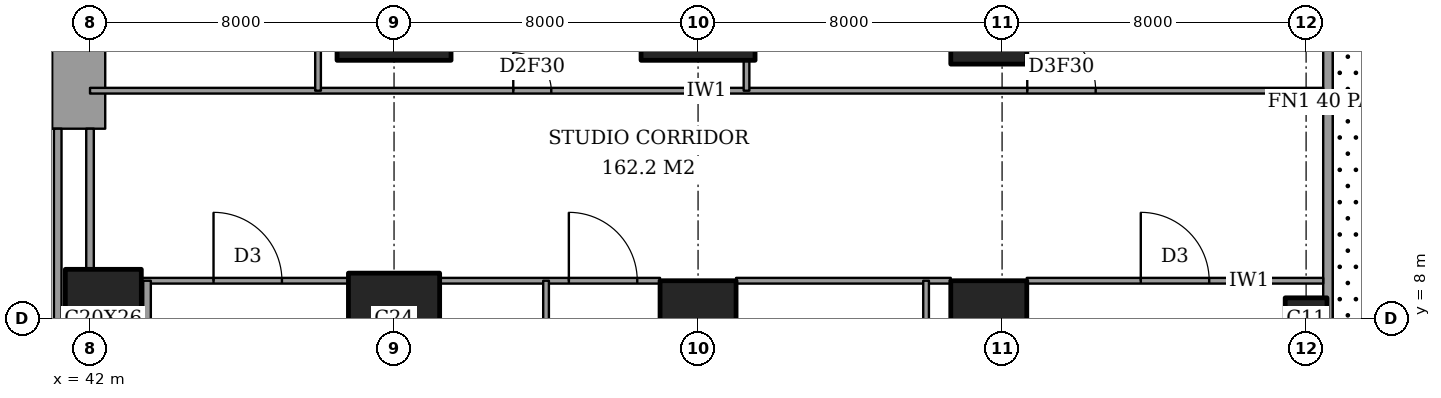
"""IFC4 building model, lengths in metres.
Left out: names, types, materials, properties, quantities, classifications, styles, units other than length and angle.
Written with IfcOpenShell. Run it as: python <this file> out.ifc"""

import sys

from ifc_helpers import new_model, si_unit, direction, frame, frame_2d, origin, origin_2d, place, context, subcontext, project, spatial, rectangle, extrude, element, fill, save


model = new_model("IFC4")
c1 = context("Model", 3, precision=1e-05, world=origin(), true_north=direction((0.0, 1.0)))
c2 = subcontext(c1, "Body", "Model", "MODEL_VIEW")
j1 = project(units=[si_unit("LENGTHUNIT", "METRE"), si_unit("PLANEANGLEUNIT", "RADIAN")], contexts=[c1])
p1 = place(None, origin())
s1 = spatial("IfcSite", under=j1, at=p1, CompositionType="ELEMENT")
p2 = place(p1, origin())
s2 = spatial("IfcBuilding", under=s1, at=p2, CompositionType="ELEMENT")
p3 = place(p2, frame((0.0, 0.0, 11.0)))
s3 = spatial("IfcBuildingStorey", under=s2, at=p3, CompositionType="ELEMENT", Elevation=11.0)
p4 = place(p3, frame((42.35, 8.0, 0.0), z_axis=(0.0, 0.0, 1.0), x_axis=(1.0, 0.0, 0.0)))
e1 = element("IfcColumn", 1, at=p4, inside=s3, PredefinedType="COLUMN", context=c2, shape_type="SweptSolid", body=[
    extrude(rectangle(XDim=2.0, YDim=2.6, at=origin_2d()), origin(), (0.0, 0.0, 1.0), 5.0),
])
p5 = place(p3, frame((50.0, 8.0, 0.0), z_axis=(0.0, 0.0, 1.0), x_axis=(1.0, 0.0, 0.0)))
e2 = element("IfcColumn", 2, at=p5, inside=s3, PredefinedType="COLUMN", context=c2, shape_type="SweptSolid", body=[
    extrude(rectangle(XDim=2.4, YDim=2.4, at=origin_2d()), origin(), (0.0, 0.0, 1.0), 5.0),
])
p6 = place(p3, frame((50.0, 16.0, 0.0), z_axis=(0.0, 0.0, 1.0), x_axis=(1.0, 0.0, 0.0)))
e3 = element("IfcColumn", 3, at=p6, inside=s3, PredefinedType="COLUMN", context=c2, shape_type="SweptSolid", body=[
    extrude(rectangle(XDim=3.0, YDim=2.4, at=origin_2d()), origin(), (0.0, 0.0, 1.0), 5.0),
])
p7 = place(p3, frame((58.0, 8.0, 0.0), z_axis=(0.0, 0.0, 1.0), x_axis=(1.0, 0.0, 0.0)))
e4 = element("IfcColumn", 4, at=p7, inside=s3, PredefinedType="COLUMN", context=c2, shape_type="SweptSolid", body=[
    extrude(rectangle(XDim=2.0, YDim=2.0, at=origin_2d()), origin(), (0.0, 0.0, 1.0), 5.0),
])
p8 = place(p3, frame((58.0, 16.0, 0.0), z_axis=(0.0, 0.0, 1.0), x_axis=(1.0, 0.0, 0.0)))
e5 = element("IfcColumn", 5, at=p8, inside=s3, PredefinedType="COLUMN", context=c2, shape_type="SweptSolid", body=[
    extrude(rectangle(XDim=3.0, YDim=2.4, at=origin_2d()), origin(), (0.0, 0.0, 1.0), 5.0),
])
p9 = place(p3, frame((65.65, 8.0, 0.0), z_axis=(0.0, 0.0, 1.0), x_axis=(1.0, 0.0, 0.0)))
e6 = element("IfcColumn", 6, at=p9, inside=s3, PredefinedType="COLUMN", context=c2, shape_type="SweptSolid", body=[
    extrude(rectangle(XDim=2.0, YDim=2.0, at=origin_2d()), origin(), (0.0, 0.0, 1.0), 5.0),
])
p10 = place(p3, frame((65.65, 16.0, 0.0), z_axis=(0.0, 0.0, 1.0), x_axis=(0.0, 1.0, 0.0)))
e7 = element("IfcColumn", 7, at=p10, inside=s3, PredefinedType="COLUMN", context=c2, shape_type="SweptSolid", body=[
    extrude(rectangle(XDim=2.6, YDim=2.0, at=origin_2d()), origin(), (0.0, 0.0, 1.0), 5.0),
])
p11 = place(p3, frame((74.0, 8.0, 0.0), z_axis=(0.0, 0.0, 1.0), x_axis=(1.0, 0.0, 0.0)))
e8 = element("IfcColumn", 8, at=p11, inside=s3, PredefinedType="COLUMN", context=c2, shape_type="SweptSolid", body=[
    extrude(rectangle(XDim=1.1, YDim=1.1, at=origin_2d()), origin(), (0.0, 0.0, 1.0), 5.0),
])
p12 = place(p3, frame((41.7, 13.0, 0.0), z_axis=(0.0, 0.0, 1.0), x_axis=(0.0, 1.0, 0.0)))
e9 = element("IfcWall", 9, at=p12, inside=s3, PredefinedType="SHEAR", context=c2, shape_type="SweptSolid", body=[
    extrude(rectangle(XDim=11.85, YDim=1.4, at=frame_2d((5.925, 0.0))), origin(), (0.0, 0.0, 1.0), 5.0),
])
p13 = place(p12, frame((7.5, 0.0, 0.0)))
e10 = element("IfcOpeningElement", 10, at=p13, cuts=e9, PredefinedType="OPENING", context=c2, shape_type="SweptSolid", body=[
    extrude(rectangle(XDim=1.8, YDim=2.4, at=frame_2d((0.9, 1.2))), frame((0.0, 0.71, 0.0), z_axis=(0.0, -1.0, 0.0), x_axis=(1.0, 0.0, 0.0)), (0.0, 0.0, 1.0), 1.42),
])
p14 = place(p3, frame((74.575, -8.575, 0.0), z_axis=(0.0, 0.0, 1.0), x_axis=(0.0, 1.0, 0.0)))
e11 = element("IfcWall", 11, at=p14, inside=s3, PredefinedType="SOLIDWALL", context=c2, shape_type="SweptSolid", body=[
    extrude(rectangle(XDim=65.15, YDim=0.25, at=frame_2d((32.575, 0.0))), origin(), (0.0, 0.0, 1.0), 5.0),
])
p15 = place(p14, frame((12.075, 0.0, 0.0)))
e12 = element("IfcOpeningElement", 12, at=p15, cuts=e11, PredefinedType="OPENING", context=c2, shape_type="SweptSolid", body=[
    extrude(rectangle(XDim=1.0, YDim=2.4, at=frame_2d((0.5, 1.2))), frame((0.0, 0.135, 0.0), z_axis=(0.0, -1.0, 0.0), x_axis=(1.0, 0.0, 0.0)), (0.0, 0.0, 1.0), 0.27),
])
p16 = place(p14, frame((28.075, 0.0, 0.0)))
e13 = element("IfcOpeningElement", 13, at=p16, cuts=e11, PredefinedType="OPENING", context=c2, shape_type="SweptSolid", body=[
    extrude(rectangle(XDim=1.0, YDim=2.4, at=frame_2d((0.5, 1.2))), frame((0.0, 0.135, 0.0), z_axis=(0.0, -1.0, 0.0), x_axis=(1.0, 0.0, 0.0)), (0.0, 0.0, 1.0), 0.27),
])
p17 = place(p14, frame((41.275, 0.0, 0.0)))
e14 = element("IfcOpeningElement", 14, at=p17, cuts=e11, PredefinedType="OPENING", context=c2, shape_type="SweptSolid", body=[
    extrude(rectangle(XDim=1.0, YDim=2.4, at=frame_2d((0.5, 1.2))), frame((0.0, 0.135, 0.0), z_axis=(0.0, -1.0, 0.0), x_axis=(1.0, 0.0, 0.0)), (0.0, 0.0, 1.0), 0.27),
])
p18 = place(p3, frame((43.35, 9.0, 0.0), z_axis=(0.0, 0.0, 1.0), x_axis=(1.0, 0.0, 0.0)))
e15 = element("IfcWall", 15, at=p18, inside=s3, PredefinedType="PARTITIONING", context=c2, shape_type="SweptSolid", body=[
    extrude(rectangle(XDim=5.45, YDim=0.15, at=frame_2d((2.725, 0.0))), origin(), (0.0, 0.0, 1.0), 4.7),
])
p19 = place(p18, frame((1.9, 0.0, 0.0)))
e16 = element("IfcOpeningElement", 16, at=p19, cuts=e15, PredefinedType="OPENING", context=c2, shape_type="SweptSolid", body=[
    extrude(rectangle(XDim=1.8, YDim=2.1, at=frame_2d((0.9, 1.05))), frame((0.0, 0.085, 0.0), z_axis=(0.0, -1.0, 0.0), x_axis=(1.0, 0.0, 0.0)), (0.0, 0.0, 1.0), 0.17),
])
p20 = place(p3, frame((51.2, 9.0, 0.0), z_axis=(0.0, 0.0, 1.0), x_axis=(1.0, 0.0, 0.0)))
e17 = element("IfcWall", 17, at=p20, inside=s3, PredefinedType="PARTITIONING", context=c2, shape_type="SweptSolid", body=[
    extrude(rectangle(XDim=5.8, YDim=0.15, at=frame_2d((2.9, 0.0))), origin(), (0.0, 0.0, 1.0), 4.7),
])
p21 = place(p20, frame((3.4, 0.0, 0.0)))
e18 = element("IfcOpeningElement", 18, at=p21, cuts=e17, PredefinedType="OPENING", context=c2, shape_type="SweptSolid", body=[
    extrude(rectangle(XDim=1.8, YDim=2.1, at=frame_2d((0.9, 1.05))), frame((0.0, 0.085, 0.0), z_axis=(0.0, -1.0, 0.0), x_axis=(1.0, 0.0, 0.0)), (0.0, 0.0, 1.0), 0.17),
])
p22 = place(p3, frame((59.0, 9.0, 0.0), z_axis=(0.0, 0.0, 1.0), x_axis=(1.0, 0.0, 0.0)))
e19 = element("IfcWall", 19, at=p22, inside=s3, PredefinedType="PARTITIONING", context=c2, shape_type="SweptSolid", body=[
    extrude(rectangle(XDim=5.65, YDim=0.15, at=frame_2d((2.825, 0.0))), origin(), (0.0, 0.0, 1.0), 4.7),
])
p23 = place(p3, frame((66.65, 9.0, 0.0), z_axis=(0.0, 0.0, 1.0), x_axis=(1.0, 0.0, 0.0)))
e20 = element("IfcWall", 20, at=p23, inside=s3, PredefinedType="PARTITIONING", context=c2, shape_type="SweptSolid", body=[
    extrude(rectangle(XDim=7.8, YDim=0.15, at=frame_2d((3.9, 0.0))), origin(), (0.0, 0.0, 1.0), 4.7),
])
p24 = place(p23, frame((3.0, 0.0, 0.0)))
e21 = element("IfcOpeningElement", 21, at=p24, cuts=e20, PredefinedType="OPENING", context=c2, shape_type="SweptSolid", body=[
    extrude(rectangle(XDim=1.8, YDim=2.1, at=frame_2d((0.9, 1.05))), frame((0.0, 0.085, 0.0), z_axis=(0.0, -1.0, 0.0), x_axis=(1.0, 0.0, 0.0)), (0.0, 0.0, 1.0), 0.17),
])
p25 = place(p3, frame((42.0, 14.0, 0.0), z_axis=(0.0, 0.0, 1.0), x_axis=(1.0, 0.0, 0.0)))
e22 = element("IfcWall", 22, at=p25, inside=s3, PredefinedType="PARTITIONING", context=c2, shape_type="SweptSolid", body=[
    extrude(rectangle(XDim=32.45, YDim=0.15, at=frame_2d((16.225, 0.0))), origin(), (0.0, 0.0, 1.0), 4.7),
])
p26 = place(p25, frame((11.137, 0.0, 0.0)))
e23 = element("IfcOpeningElement", 23, at=p26, cuts=e22, PredefinedType="OPENING", context=c2, shape_type="SweptSolid", body=[
    extrude(rectangle(XDim=1.0, YDim=2.1, at=frame_2d((0.5, 1.05))), frame((0.0, 0.085, 0.0), z_axis=(0.0, -1.0, 0.0), x_axis=(1.0, 0.0, 0.0)), (0.0, 0.0, 1.0), 0.17),
])
p27 = place(p25, frame((24.663, 0.0, 0.0)))
e24 = element("IfcOpeningElement", 24, at=p27, cuts=e22, PredefinedType="OPENING", context=c2, shape_type="SweptSolid", body=[
    extrude(rectangle(XDim=1.8, YDim=2.1, at=frame_2d((0.9, 1.05))), frame((0.0, 0.085, 0.0), z_axis=(0.0, -1.0, 0.0), x_axis=(1.0, 0.0, 0.0)), (0.0, 0.0, 1.0), 0.17),
])
p28 = place(p3, frame((41.15, -0.45, 0.0), z_axis=(0.0, 0.0, 1.0), x_axis=(0.0, 1.0, 0.0)))
e25 = element("IfcWall", 25, at=p28, inside=s3, PredefinedType="PARTITIONING", context=c2, shape_type="SweptSolid", body=[
    extrude(rectangle(XDim=13.45, YDim=0.2, at=frame_2d((6.725, 0.0))), origin(), (0.0, 0.0, 1.0), 4.7),
])
p29 = place(p3, frame((42.0, 9.3, 0.0), z_axis=(0.0, 0.0, 1.0), x_axis=(0.0, 1.0, 0.0)))
e26 = element("IfcWall", 26, at=p29, inside=s3, PredefinedType="PARTITIONING", context=c2, shape_type="SweptSolid", body=[
    extrude(rectangle(XDim=3.7, YDim=0.2, at=frame_2d((1.85, 0.0))), origin(), (0.0, 0.0, 1.0), 4.7),
])
p30 = place(p3, frame((43.5, -8.45, 0.0), z_axis=(0.0, 0.0, 1.0), x_axis=(0.0, 1.0, 0.0)))
e27 = element("IfcWall", 27, at=p30, inside=s3, PredefinedType="PARTITIONING", context=c2, shape_type="SweptSolid", body=[
    extrude(rectangle(XDim=17.45, YDim=0.2, at=frame_2d((8.725, 0.0))), origin(), (0.0, 0.0, 1.0), 4.7),
])
p31 = place(p3, frame((48.0, 14.0, 0.0), z_axis=(0.0, 0.0, 1.0), x_axis=(0.0, 1.0, 0.0)))
e28 = element("IfcWall", 28, at=p31, inside=s3, PredefinedType="PARTITIONING", context=c2, shape_type="SweptSolid", body=[
    extrude(rectangle(XDim=14.0, YDim=0.15, at=frame_2d((7.0, 0.0))), origin(), (0.0, 0.0, 1.0), 4.7),
])
p32 = place(p31, frame((10.3, 0.0, 0.0)))
e29 = element("IfcOpeningElement", 29, at=p32, cuts=e28, PredefinedType="OPENING", context=c2, shape_type="SweptSolid", body=[
    extrude(rectangle(XDim=1.8, YDim=2.1, at=frame_2d((0.9, 1.05))), frame((0.0, 0.085, 0.0), z_axis=(0.0, -1.0, 0.0), x_axis=(1.0, 0.0, 0.0)), (0.0, 0.0, 1.0), 0.17),
])
p33 = place(p3, frame((54.0, -8.45, 0.0), z_axis=(0.0, 0.0, 1.0), x_axis=(0.0, 1.0, 0.0)))
e30 = element("IfcWall", 30, at=p33, inside=s3, PredefinedType="PARTITIONING", context=c2, shape_type="SweptSolid", body=[
    extrude(rectangle(XDim=17.45, YDim=0.15, at=frame_2d((8.725, 0.0))), origin(), (0.0, 0.0, 1.0), 4.7),
])
p34 = place(p3, frame((59.275, 14.0, 0.0), z_axis=(0.0, 0.0, 1.0), x_axis=(0.0, 1.0, 0.0)))
e31 = element("IfcWall", 31, at=p34, inside=s3, PredefinedType="PARTITIONING", context=c2, shape_type="SweptSolid", body=[
    extrude(rectangle(XDim=0.8, YDim=0.15, at=frame_2d((0.4, 0.0))), origin(), (0.0, 0.0, 1.0), 4.7),
])
p35 = place(p3, frame((64.0, -8.45, 0.0), z_axis=(0.0, 0.0, 1.0), x_axis=(0.0, 1.0, 0.0)))
e32 = element("IfcWall", 32, at=p35, inside=s3, PredefinedType="PARTITIONING", context=c2, shape_type="SweptSolid", body=[
    extrude(rectangle(XDim=17.45, YDim=0.15, at=frame_2d((8.725, 0.0))), origin(), (0.0, 0.0, 1.0), 4.7),
])
p36 = place(p26, origin())
e33 = element("IfcDoor", 33, at=p36, inside=s3, OperationType="SINGLE_SWING_RIGHT", PredefinedType="DOOR", context=c2, shape_type="SweptSolid", body=[
    extrude(rectangle(XDim=1.0, YDim=2.1, at=frame_2d((0.5, 1.05))), frame((0.0, 0.025, 0.0), z_axis=(0.0, -1.0, 0.0), x_axis=(1.0, 0.0, 0.0)), (0.0, 0.0, 1.0), 0.05),
])
fill(e23, e33)
p37 = place(p19, origin())
e34 = element("IfcDoor", 34, at=p37, inside=s3, OperationType="DOUBLE_DOOR_DOUBLE_SWING", PredefinedType="DOOR", context=c2, shape_type="SweptSolid", body=[
    extrude(rectangle(XDim=1.8, YDim=2.1, at=frame_2d((0.9, 1.05))), frame((0.0, 0.025, 0.0), z_axis=(0.0, -1.0, 0.0), x_axis=(1.0, 0.0, 0.0)), (0.0, 0.0, 1.0), 0.05),
])
fill(e16, e34)
p38 = place(p21, origin())
e35 = element("IfcDoor", 35, at=p38, inside=s3, OperationType="DOUBLE_DOOR_DOUBLE_SWING", PredefinedType="DOOR", context=c2, shape_type="SweptSolid", body=[
    extrude(rectangle(XDim=1.8, YDim=2.1, at=frame_2d((0.9, 1.05))), frame((0.0, 0.025, 0.0), z_axis=(0.0, -1.0, 0.0), x_axis=(1.0, 0.0, 0.0)), (0.0, 0.0, 1.0), 0.05),
])
fill(e18, e35)
p39 = place(p24, origin())
e36 = element("IfcDoor", 36, at=p39, inside=s3, OperationType="DOUBLE_DOOR_DOUBLE_SWING", PredefinedType="DOOR", context=c2, shape_type="SweptSolid", body=[
    extrude(rectangle(XDim=1.8, YDim=2.1, at=frame_2d((0.9, 1.05))), frame((0.0, 0.025, 0.0), z_axis=(0.0, -1.0, 0.0), x_axis=(1.0, 0.0, 0.0)), (0.0, 0.0, 1.0), 0.05),
])
fill(e21, e36)
p40 = place(p27, origin())
e37 = element("IfcDoor", 37, at=p40, inside=s3, OperationType="DOUBLE_DOOR_DOUBLE_SWING", PredefinedType="DOOR", context=c2, shape_type="SweptSolid", body=[
    extrude(rectangle(XDim=1.8, YDim=2.1, at=frame_2d((0.9, 1.05))), frame((0.0, 0.025, 0.0), z_axis=(0.0, -1.0, 0.0), x_axis=(1.0, 0.0, 0.0)), (0.0, 0.0, 1.0), 0.05),
])
fill(e24, e37)
save(model, sys.argv[1])
